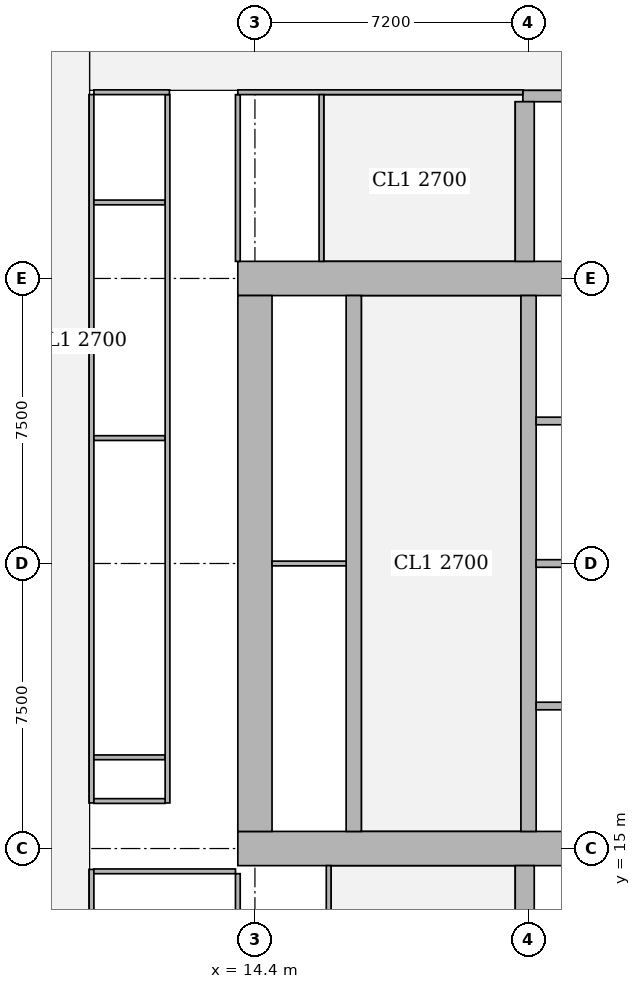
"""IFC4 building model, lengths in metres.
Left out: names, types, materials, properties, quantities, classifications, styles, units other than length and angle.
Written with IfcOpenShell. Run it as: python <this file> out.ifc"""

import sys

from ifc_helpers import new_model, si_unit, direction, frame, frame_2d, origin, place, context, subcontext, project, spatial, rectangle, extrude, element, fill, save


model = new_model("IFC4")
c1 = context("Model", 3, precision=1e-05, world=origin(), true_north=direction((0.0, 1.0)))
c2 = subcontext(c1, "Body", "Model", "MODEL_VIEW")
j1 = project(units=[si_unit("LENGTHUNIT", "METRE"), si_unit("PLANEANGLEUNIT", "RADIAN")], contexts=[c1])
p1 = place(None, origin())
s1 = spatial("IfcSite", under=j1, at=p1, CompositionType="ELEMENT")
p2 = place(p1, origin())
s2 = spatial("IfcBuilding", under=s1, at=p2, CompositionType="ELEMENT")
p3 = place(p2, frame((0.0, 0.0, 169.55)))
s3 = spatial("IfcBuildingStorey", under=s2, at=p3, CompositionType="ELEMENT", Elevation=169.55)
p4 = place(p3, frame((13.95, 15.0, 0.0), z_axis=(0.0, 0.0, 1.0), x_axis=(1.0, 0.0, 0.0)))
e1 = element("IfcWall", 1, at=p4, inside=s3, PredefinedType="SHEAR", context=c2, shape_type="SweptSolid", body=[
    extrude(rectangle(XDim=15.3, YDim=0.9, at=frame_2d((7.65, 0.0))), origin(), (0.0, 0.0, 1.0), 3.75),
])
p5 = place(p4, frame((4.45, 0.0, 0.0)))
e2 = element("IfcOpeningElement", 2, at=p5, cuts=e1, PredefinedType="OPENING", context=c2, shape_type="SweptSolid", body=[
    extrude(rectangle(XDim=1.8, YDim=2.1, at=frame_2d((0.9, 1.05))), frame((0.0, 0.46, 0.0), z_axis=(0.0, -1.0, 0.0), x_axis=(1.0, 0.0, 0.0)), (0.0, 0.0, 1.0), 0.92),
])
p6 = place(p4, frame((10.7, 0.0, 0.0)))
e3 = element("IfcOpeningElement", 3, at=p6, cuts=e1, PredefinedType="OPENING", context=c2, shape_type="SweptSolid", body=[
    extrude(rectangle(XDim=1.1, YDim=2.1, at=frame_2d((0.55, 1.05))), frame((0.0, 0.46, 0.0), z_axis=(0.0, -1.0, 0.0), x_axis=(1.0, 0.0, 0.0)), (0.0, 0.0, 1.0), 0.92),
])
p7 = place(p3, frame((13.95, 30.0, 0.0), z_axis=(0.0, 0.0, 1.0), x_axis=(1.0, 0.0, 0.0)))
e4 = element("IfcWall", 4, at=p7, inside=s3, PredefinedType="SHEAR", context=c2, shape_type="SweptSolid", body=[
    extrude(rectangle(XDim=15.3, YDim=0.9, at=frame_2d((7.65, 0.0))), origin(), (0.0, 0.0, 1.0), 3.75),
])
p8 = place(p7, frame((4.45, 0.0, 0.0)))
e5 = element("IfcOpeningElement", 5, at=p8, cuts=e4, PredefinedType="OPENING", context=c2, shape_type="SweptSolid", body=[
    extrude(rectangle(XDim=1.8, YDim=2.1, at=frame_2d((0.9, 1.05))), frame((0.0, 0.46, 0.0), z_axis=(0.0, -1.0, 0.0), x_axis=(1.0, 0.0, 0.0)), (0.0, 0.0, 1.0), 0.92),
])
p9 = place(p7, frame((10.7, 0.0, 0.0)))
e6 = element("IfcOpeningElement", 6, at=p9, cuts=e4, PredefinedType="OPENING", context=c2, shape_type="SweptSolid", body=[
    extrude(rectangle(XDim=1.1, YDim=2.1, at=frame_2d((0.55, 1.05))), frame((0.0, 0.46, 0.0), z_axis=(0.0, -1.0, 0.0), x_axis=(1.0, 0.0, 0.0)), (0.0, 0.0, 1.0), 0.92),
])
p10 = place(p3, frame((14.4, 15.45, 0.0), z_axis=(0.0, 0.0, 1.0), x_axis=(0.0, 1.0, 0.0)))
e7 = element("IfcWall", 7, at=p10, inside=s3, PredefinedType="SHEAR", context=c2, shape_type="SweptSolid", body=[
    extrude(rectangle(XDim=14.1, YDim=0.9, at=frame_2d((7.05, 0.0))), origin(), (0.0, 0.0, 1.0), 3.75),
])
p11 = place(p3, frame((17.0, 15.45, 0.0), z_axis=(0.0, 0.0, 1.0), x_axis=(0.0, 1.0, 0.0)))
e8 = element("IfcWall", 8, at=p11, inside=s3, PredefinedType="SHEAR", context=c2, shape_type="SweptSolid", body=[
    extrude(rectangle(XDim=14.1, YDim=0.4, at=frame_2d((7.05, 0.0))), origin(), (0.0, 0.0, 1.0), 3.75),
])
p12 = place(p11, frame((0.925, 0.0, 0.0)))
e9 = element("IfcOpeningElement", 9, at=p12, cuts=e8, PredefinedType="OPENING", context=c2, shape_type="SweptSolid", body=[
    extrude(rectangle(XDim=1.0, YDim=2.1, at=frame_2d((0.5, 1.05))), frame((0.0, 0.21, 0.0), z_axis=(0.0, -1.0, 0.0), x_axis=(1.0, 0.0, 0.0)), (0.0, 0.0, 1.0), 0.42),
])
p13 = place(p11, frame((4.675, 0.0, 0.0)))
e10 = element("IfcOpeningElement", 10, at=p13, cuts=e8, PredefinedType="OPENING", context=c2, shape_type="SweptSolid", body=[
    extrude(rectangle(XDim=1.0, YDim=2.1, at=frame_2d((0.5, 1.05))), frame((0.0, 0.21, 0.0), z_axis=(0.0, -1.0, 0.0), x_axis=(1.0, 0.0, 0.0)), (0.0, 0.0, 1.0), 0.42),
])
p14 = place(p11, frame((8.425, 0.0, 0.0)))
e11 = element("IfcOpeningElement", 11, at=p14, cuts=e8, PredefinedType="OPENING", context=c2, shape_type="SweptSolid", body=[
    extrude(rectangle(XDim=1.0, YDim=2.1, at=frame_2d((0.5, 1.05))), frame((0.0, 0.21, 0.0), z_axis=(0.0, -1.0, 0.0), x_axis=(1.0, 0.0, 0.0)), (0.0, 0.0, 1.0), 0.42),
])
p15 = place(p11, frame((12.175, 0.0, 0.0)))
e12 = element("IfcOpeningElement", 12, at=p15, cuts=e8, PredefinedType="OPENING", context=c2, shape_type="SweptSolid", body=[
    extrude(rectangle(XDim=1.0, YDim=2.1, at=frame_2d((0.5, 1.05))), frame((0.0, 0.21, 0.0), z_axis=(0.0, -1.0, 0.0), x_axis=(1.0, 0.0, 0.0)), (0.0, 0.0, 1.0), 0.42),
])
p16 = place(p3, frame((21.6, 15.45, 0.0), z_axis=(0.0, 0.0, 1.0), x_axis=(0.0, 1.0, 0.0)))
e13 = element("IfcWall", 13, at=p16, inside=s3, PredefinedType="SHEAR", context=c2, shape_type="SweptSolid", body=[
    extrude(rectangle(XDim=14.1, YDim=0.4, at=frame_2d((7.05, 0.0))), origin(), (0.0, 0.0, 1.0), 3.75),
])
p17 = place(p16, frame((0.875, 0.0, 0.0)))
e14 = element("IfcOpeningElement", 14, at=p17, cuts=e13, PredefinedType="OPENING", context=c2, shape_type="SweptSolid", body=[
    extrude(rectangle(XDim=1.1, YDim=2.1, at=frame_2d((0.55, 1.05))), frame((0.0, 0.21, 0.0), z_axis=(0.0, -1.0, 0.0), x_axis=(1.0, 0.0, 0.0)), (0.0, 0.0, 1.0), 0.42),
])
p18 = place(p16, frame((4.625, 0.0, 0.0)))
e15 = element("IfcOpeningElement", 15, at=p18, cuts=e13, PredefinedType="OPENING", context=c2, shape_type="SweptSolid", body=[
    extrude(rectangle(XDim=1.1, YDim=2.1, at=frame_2d((0.55, 1.05))), frame((0.0, 0.21, 0.0), z_axis=(0.0, -1.0, 0.0), x_axis=(1.0, 0.0, 0.0)), (0.0, 0.0, 1.0), 0.42),
])
p19 = place(p16, frame((8.375, 0.0, 0.0)))
e16 = element("IfcOpeningElement", 16, at=p19, cuts=e13, PredefinedType="OPENING", context=c2, shape_type="SweptSolid", body=[
    extrude(rectangle(XDim=1.1, YDim=2.1, at=frame_2d((0.55, 1.05))), frame((0.0, 0.21, 0.0), z_axis=(0.0, -1.0, 0.0), x_axis=(1.0, 0.0, 0.0)), (0.0, 0.0, 1.0), 0.42),
])
p20 = place(p16, frame((12.125, 0.0, 0.0)))
e17 = element("IfcOpeningElement", 17, at=p20, cuts=e13, PredefinedType="OPENING", context=c2, shape_type="SweptSolid", body=[
    extrude(rectangle(XDim=1.1, YDim=2.1, at=frame_2d((0.55, 1.05))), frame((0.0, 0.21, 0.0), z_axis=(0.0, -1.0, 0.0), x_axis=(1.0, 0.0, 0.0)), (0.0, 0.0, 1.0), 0.42),
])
p21 = place(p3, frame((21.5, 10.35, 0.0), z_axis=(0.0, 0.0, 1.0), x_axis=(0.0, 1.0, 0.0)))
e18 = element("IfcWall", 18, at=p21, inside=s3, PredefinedType="SHEAR", context=c2, shape_type="SweptSolid", body=[
    extrude(rectangle(XDim=4.2, YDim=0.5, at=frame_2d((2.1, 0.0))), origin(), (0.0, 0.0, 1.0), 3.75),
])
p22 = place(p3, frame((21.45, 34.8, 0.0), z_axis=(0.0, 0.0, 1.0), x_axis=(1.0, 0.0, 0.0)))
e19 = element("IfcWall", 19, at=p22, inside=s3, PredefinedType="SHEAR", context=c2, shape_type="SweptSolid", body=[
    extrude(rectangle(XDim=7.5, YDim=0.3, at=frame_2d((3.75, 0.0))), origin(), (0.0, 0.0, 1.0), 3.75),
])
p23 = place(p22, frame((0.5, 0.0, 0.0)))
e20 = element("IfcOpeningElement", 20, at=p23, cuts=e19, PredefinedType="OPENING", context=c2, shape_type="SweptSolid", body=[
    extrude(rectangle(XDim=1.1, YDim=2.1, at=frame_2d((0.55, 1.05))), frame((0.0, 0.16, 0.0), z_axis=(0.0, -1.0, 0.0), x_axis=(1.0, 0.0, 0.0)), (0.0, 0.0, 1.0), 0.32),
])
p24 = place(p3, frame((21.5, 30.45, 0.0), z_axis=(0.0, 0.0, 1.0), x_axis=(0.0, 1.0, 0.0)))
e21 = element("IfcWall", 21, at=p24, inside=s3, PredefinedType="SHEAR", context=c2, shape_type="SweptSolid", body=[
    extrude(rectangle(XDim=4.2, YDim=0.5, at=frame_2d((2.1, 0.0))), origin(), (0.0, 0.0, 1.0), 3.75),
])
p25 = place(p3, frame((10.1, 10.162, 0.0), z_axis=(0.0, 0.0, 1.0), x_axis=(0.0, 1.0, 0.0)))
e22 = element("IfcWall", 22, at=p25, inside=s3, PredefinedType="PARTITIONING", context=c2, shape_type="SweptSolid", body=[
    extrude(rectangle(XDim=4.288, YDim=0.125, at=frame_2d((2.144, 0.0))), origin(), (0.0, 0.0, 1.0), 3.5),
])
p26 = place(p25, frame((1.563, 0.0, 0.0)))
e23 = element("IfcOpeningElement", 23, at=p26, cuts=e22, PredefinedType="OPENING", context=c2, shape_type="SweptSolid", body=[
    extrude(rectangle(XDim=1.0, YDim=2.1, at=frame_2d((0.5, 1.05))), frame((0.0, 0.073, 0.0), z_axis=(0.0, -1.0, 0.0), x_axis=(1.0, 0.0, 0.0)), (0.0, 0.0, 1.0), 0.145),
])
p27 = place(p3, frame((10.1, 16.2, 0.0), z_axis=(0.0, 0.0, 1.0), x_axis=(0.0, 1.0, 0.0)))
e24 = element("IfcWall", 24, at=p27, inside=s3, PredefinedType="PARTITIONING", context=c2, shape_type="SweptSolid", body=[
    extrude(rectangle(XDim=18.638, YDim=0.125, at=frame_2d((9.319, 0.0))), origin(), (0.0, 0.0, 1.0), 3.5),
])
p28 = place(p27, frame((4.9, 0.0, 0.0)))
e25 = element("IfcOpeningElement", 25, at=p28, cuts=e24, PredefinedType="OPENING", context=c2, shape_type="SweptSolid", body=[
    extrude(rectangle(XDim=1.0, YDim=2.1, at=frame_2d((0.5, 1.05))), frame((0.0, 0.073, 0.0), z_axis=(0.0, -1.0, 0.0), x_axis=(1.0, 0.0, 0.0)), (0.0, 0.0, 1.0), 0.145),
])
p29 = place(p27, frame((12.2, 0.0, 0.0)))
e26 = element("IfcOpeningElement", 26, at=p29, cuts=e24, PredefinedType="OPENING", context=c2, shape_type="SweptSolid", body=[
    extrude(rectangle(XDim=1.0, YDim=2.1, at=frame_2d((0.5, 1.05))), frame((0.0, 0.073, 0.0), z_axis=(0.0, -1.0, 0.0), x_axis=(1.0, 0.0, 0.0)), (0.0, 0.0, 1.0), 0.145),
])
p30 = place(p27, frame((16.775, 0.0, 0.0)))
e27 = element("IfcOpeningElement", 27, at=p30, cuts=e24, PredefinedType="OPENING", context=c2, shape_type="SweptSolid", body=[
    extrude(rectangle(XDim=1.0, YDim=2.1, at=frame_2d((0.5, 1.05))), frame((0.0, 0.073, 0.0), z_axis=(0.0, -1.0, 0.0), x_axis=(1.0, 0.0, 0.0)), (0.0, 0.0, 1.0), 0.145),
])
p31 = place(p3, frame((10.162, 14.4, 0.0), z_axis=(0.0, 0.0, 1.0), x_axis=(1.0, 0.0, 0.0)))
e28 = element("IfcWall", 28, at=p31, inside=s3, PredefinedType="PARTITIONING", context=c2, shape_type="SweptSolid", body=[
    extrude(rectangle(XDim=3.726, YDim=0.125, at=frame_2d((1.863, 0.0))), origin(), (0.0, 0.0, 1.0), 3.5),
])
for number, where, z_axis, x_axis in (
    (29, (10.162, 17.4, 0.0), (0.0, 0.0, 1.0), (1.0, 0.0, 0.0)),
    (30, (10.162, 25.8, 0.0), (0.0, 0.0, 1.0), (1.0, 0.0, 0.0)),
    (31, (10.162, 32.0, 0.0), (0.0, 0.0, 1.0), (1.0, 0.0, 0.0)),
):
    element("IfcWall", number, at=place(p3, frame(where, z_axis=z_axis, x_axis=x_axis)), inside=s3, PredefinedType="PARTITIONING", context=c2, shape_type="SweptSolid", body=[
        extrude(rectangle(XDim=1.875, YDim=0.125, at=frame_2d((0.938, 0.0))), origin(), (0.0, 0.0, 1.0), 3.5),
    ])
p32 = place(p3, frame((12.1, 16.2, 0.0), z_axis=(0.0, 0.0, 1.0), x_axis=(0.0, 1.0, 0.0)))
e32 = element("IfcWall", 32, at=p32, inside=s3, PredefinedType="PARTITIONING", context=c2, shape_type="SweptSolid", body=[
    extrude(rectangle(XDim=18.637, YDim=0.125, at=frame_2d((9.318, 0.0))), origin(), (0.0, 0.0, 1.0), 3.5),
])
p33 = place(p3, frame((10.162, 16.25, 0.0), z_axis=(0.0, 0.0, 1.0), x_axis=(1.0, 0.0, 0.0)))
e33 = element("IfcWall", 33, at=p33, inside=s3, PredefinedType="PARTITIONING", context=c2, shape_type="SweptSolid", body=[
    extrude(rectangle(XDim=1.875, YDim=0.125, at=frame_2d((0.938, 0.0))), origin(), (0.0, 0.0, 1.0), 3.5),
])
p34 = place(p3, frame((13.95, 10.163, 0.0), z_axis=(0.0, 0.0, 1.0), x_axis=(0.0, 1.0, 0.0)))
e34 = element("IfcWall", 34, at=p34, inside=s3, PredefinedType="PARTITIONING", context=c2, shape_type="SweptSolid", body=[
    extrude(rectangle(XDim=4.175, YDim=0.125, at=frame_2d((2.087, 0.0))), origin(), (0.0, 0.0, 1.0), 3.5),
])
p35 = place(p3, frame((13.95, 30.45, 0.0), z_axis=(0.0, 0.0, 1.0), x_axis=(0.0, 1.0, 0.0)))
e35 = element("IfcWall", 35, at=p35, inside=s3, PredefinedType="PARTITIONING", context=c2, shape_type="SweptSolid", body=[
    extrude(rectangle(XDim=4.387, YDim=0.125, at=frame_2d((2.193, 0.0))), origin(), (0.0, 0.0, 1.0), 3.5),
])
p36 = place(p3, frame((10.162, 34.9, 0.0), z_axis=(0.0, 0.0, 1.0), x_axis=(1.0, 0.0, 0.0)))
e36 = element("IfcWall", 36, at=p36, inside=s3, PredefinedType="PARTITIONING", context=c2, shape_type="SweptSolid", body=[
    extrude(rectangle(XDim=1.988, YDim=0.125, at=frame_2d((0.994, 0.0))), origin(), (0.0, 0.0, 1.0), 3.5),
])
p37 = place(p3, frame((13.95, 34.9, 0.0), z_axis=(0.0, 0.0, 1.0), x_axis=(1.0, 0.0, 0.0)))
e37 = element("IfcWall", 37, at=p37, inside=s3, PredefinedType="PARTITIONING", context=c2, shape_type="SweptSolid", body=[
    extrude(rectangle(XDim=7.5, YDim=0.125, at=frame_2d((3.75, 0.0))), origin(), (0.0, 0.0, 1.0), 3.5),
])
p38 = place(p37, frame((3.95, 0.0, 0.0)))
e38 = element("IfcOpeningElement", 38, at=p38, cuts=e37, PredefinedType="OPENING", context=c2, shape_type="SweptSolid", body=[
    extrude(rectangle(XDim=1.8, YDim=2.1, at=frame_2d((0.9, 1.05))), frame((0.0, 0.073, 0.0), z_axis=(0.0, -1.0, 0.0), x_axis=(1.0, 0.0, 0.0)), (0.0, 0.0, 1.0), 0.145),
])
p39 = place(p3, frame((16.34, 10.163, 0.0), z_axis=(0.0, 0.0, 1.0), x_axis=(0.0, 1.0, 0.0)))
e39 = element("IfcWall", 39, at=p39, inside=s3, PredefinedType="PARTITIONING", context=c2, shape_type="SweptSolid", body=[
    extrude(rectangle(XDim=4.387, YDim=0.125, at=frame_2d((2.193, 0.0))), origin(), (0.0, 0.0, 1.0), 3.5),
])
p40 = place(p39, frame((1.637, 0.0, 0.0)))
e40 = element("IfcOpeningElement", 40, at=p40, cuts=e39, PredefinedType="OPENING", context=c2, shape_type="SweptSolid", body=[
    extrude(rectangle(XDim=1.0, YDim=2.1, at=frame_2d((0.5, 1.05))), frame((0.0, 0.073, 0.0), z_axis=(0.0, -1.0, 0.0), x_axis=(1.0, 0.0, 0.0)), (0.0, 0.0, 1.0), 0.145),
])
p41 = place(p3, frame((16.15, 30.45, 0.0), z_axis=(0.0, 0.0, 1.0), x_axis=(0.0, 1.0, 0.0)))
e41 = element("IfcWall", 41, at=p41, inside=s3, PredefinedType="PARTITIONING", context=c2, shape_type="SweptSolid", body=[
    extrude(rectangle(XDim=4.387, YDim=0.125, at=frame_2d((2.193, 0.0))), origin(), (0.0, 0.0, 1.0), 3.5),
])
p42 = place(p41, frame((1.75, 0.0, 0.0)))
e42 = element("IfcOpeningElement", 42, at=p42, cuts=e41, PredefinedType="OPENING", context=c2, shape_type="SweptSolid", body=[
    extrude(rectangle(XDim=1.0, YDim=2.1, at=frame_2d((0.5, 1.05))), frame((0.0, 0.073, 0.0), z_axis=(0.0, -1.0, 0.0), x_axis=(1.0, 0.0, 0.0)), (0.0, 0.0, 1.0), 0.145),
])
p43 = place(p3, frame((14.85, 22.5, 0.0), z_axis=(0.0, 0.0, 1.0), x_axis=(1.0, 0.0, 0.0)))
e43 = element("IfcWall", 43, at=p43, inside=s3, PredefinedType="PARTITIONING", context=c2, shape_type="SweptSolid", body=[
    extrude(rectangle(XDim=1.95, YDim=0.125, at=frame_2d((0.975, 0.0))), origin(), (0.0, 0.0, 1.0), 3.5),
])
for number, where, z_axis, x_axis in (
    (44, (21.8, 18.75, 0.0), (0.0, 0.0, 1.0), (1.0, 0.0, 0.0)),
    (45, (21.8, 22.5, 0.0), (0.0, 0.0, 1.0), (1.0, 0.0, 0.0)),
    (46, (21.8, 26.25, 0.0), (0.0, 0.0, 1.0), (1.0, 0.0, 0.0)),
):
    element("IfcWall", number, at=place(p3, frame(where, z_axis=z_axis, x_axis=x_axis)), inside=s3, PredefinedType="SOLIDWALL", context=c2, shape_type="SweptSolid", body=[
        extrude(rectangle(XDim=2.2, YDim=0.2, at=frame_2d((1.1, 0.0))), origin(), (0.0, 0.0, 1.0), 3.5),
    ])
p44 = place(p28, origin())
e47 = element("IfcDoor", 47, at=p44, inside=s3, OperationType="SINGLE_SWING_RIGHT", PredefinedType="DOOR", context=c2, shape_type="SweptSolid", body=[
    extrude(rectangle(XDim=1.0, YDim=2.1, at=frame_2d((0.5, 1.05))), frame((0.0, 0.025, 0.0), z_axis=(0.0, -1.0, 0.0), x_axis=(1.0, 0.0, 0.0)), (0.0, 0.0, 1.0), 0.05),
])
fill(e25, e47)
p45 = place(p29, origin())
e48 = element("IfcDoor", 48, at=p45, inside=s3, OperationType="SINGLE_SWING_RIGHT", PredefinedType="DOOR", context=c2, shape_type="SweptSolid", body=[
    extrude(rectangle(XDim=1.0, YDim=2.1, at=frame_2d((0.5, 1.05))), frame((0.0, 0.025, 0.0), z_axis=(0.0, -1.0, 0.0), x_axis=(1.0, 0.0, 0.0)), (0.0, 0.0, 1.0), 0.05),
])
fill(e26, e48)
p46 = place(p30, origin())
e49 = element("IfcDoor", 49, at=p46, inside=s3, OperationType="SINGLE_SWING_LEFT", PredefinedType="DOOR", context=c2, shape_type="SweptSolid", body=[
    extrude(rectangle(XDim=1.0, YDim=2.1, at=frame_2d((0.5, 1.05))), frame((0.0, 0.025, 0.0), z_axis=(0.0, -1.0, 0.0), x_axis=(1.0, 0.0, 0.0)), (0.0, 0.0, 1.0), 0.05),
])
fill(e27, e49)
p47 = place(p42, origin())
e50 = element("IfcDoor", 50, at=p47, inside=s3, OperationType="SINGLE_SWING_RIGHT", PredefinedType="DOOR", context=c2, shape_type="SweptSolid", body=[
    extrude(rectangle(XDim=1.0, YDim=2.1, at=frame_2d((0.5, 1.05))), frame((0.0, 0.025, 0.0), z_axis=(0.0, -1.0, 0.0), x_axis=(1.0, 0.0, 0.0)), (0.0, 0.0, 1.0), 0.05),
])
fill(e42, e50)
p48 = place(p38, origin())
e51 = element("IfcDoor", 51, at=p48, inside=s3, OperationType="DOUBLE_DOOR_SINGLE_SWING", PredefinedType="DOOR", context=c2, shape_type="SweptSolid", body=[
    extrude(rectangle(XDim=1.8, YDim=2.1, at=frame_2d((0.9, 1.05))), frame((0.0, 0.025, 0.0), z_axis=(0.0, -1.0, 0.0), x_axis=(1.0, 0.0, 0.0)), (0.0, 0.0, 1.0), 0.05),
])
fill(e38, e51)
p49 = place(p12, origin())
e52 = element("IfcDoor", 52, at=p49, inside=s3, OperationType="SINGLE_SWING_LEFT", PredefinedType="DOOR", context=c2, shape_type="SweptSolid", body=[
    extrude(rectangle(XDim=1.0, YDim=2.1, at=frame_2d((0.5, 1.05))), frame((0.0, 0.025, 0.0), z_axis=(0.0, -1.0, 0.0), x_axis=(1.0, 0.0, 0.0)), (0.0, 0.0, 1.0), 0.05),
])
fill(e9, e52)
p50 = place(p13, origin())
e53 = element("IfcDoor", 53, at=p50, inside=s3, OperationType="SINGLE_SWING_RIGHT", PredefinedType="DOOR", context=c2, shape_type="SweptSolid", body=[
    extrude(rectangle(XDim=1.0, YDim=2.1, at=frame_2d((0.5, 1.05))), frame((0.0, 0.025, 0.0), z_axis=(0.0, -1.0, 0.0), x_axis=(1.0, 0.0, 0.0)), (0.0, 0.0, 1.0), 0.05),
])
fill(e10, e53)
p51 = place(p14, origin())
e54 = element("IfcDoor", 54, at=p51, inside=s3, OperationType="SINGLE_SWING_LEFT", PredefinedType="DOOR", context=c2, shape_type="SweptSolid", body=[
    extrude(rectangle(XDim=1.0, YDim=2.1, at=frame_2d((0.5, 1.05))), frame((0.0, 0.025, 0.0), z_axis=(0.0, -1.0, 0.0), x_axis=(1.0, 0.0, 0.0)), (0.0, 0.0, 1.0), 0.05),
])
fill(e11, e54)
p52 = place(p15, origin())
e55 = element("IfcDoor", 55, at=p52, inside=s3, OperationType="SINGLE_SWING_RIGHT", PredefinedType="DOOR", context=c2, shape_type="SweptSolid", body=[
    extrude(rectangle(XDim=1.0, YDim=2.1, at=frame_2d((0.5, 1.05))), frame((0.0, 0.025, 0.0), z_axis=(0.0, -1.0, 0.0), x_axis=(1.0, 0.0, 0.0)), (0.0, 0.0, 1.0), 0.05),
])
fill(e12, e55)
p53 = place(p5, origin())
e56 = element("IfcDoor", 56, at=p53, inside=s3, OperationType="DOUBLE_DOOR_SINGLE_SWING", PredefinedType="DOOR", context=c2, shape_type="SweptSolid", body=[
    extrude(rectangle(XDim=1.8, YDim=2.1, at=frame_2d((0.9, 1.05))), frame((0.0, 0.025, 0.0), z_axis=(0.0, -1.0, 0.0), x_axis=(1.0, 0.0, 0.0)), (0.0, 0.0, 1.0), 0.05),
])
fill(e2, e56)
p54 = place(p8, origin())
e57 = element("IfcDoor", 57, at=p54, inside=s3, OperationType="DOUBLE_DOOR_SINGLE_SWING", PredefinedType="DOOR", context=c2, shape_type="SweptSolid", body=[
    extrude(rectangle(XDim=1.8, YDim=2.1, at=frame_2d((0.9, 1.05))), frame((0.0, 0.025, 0.0), z_axis=(0.0, -1.0, 0.0), x_axis=(1.0, 0.0, 0.0)), (0.0, 0.0, 1.0), 0.05),
])
fill(e5, e57)
p55 = place(p17, origin())
e58 = element("IfcDoor", 58, at=p55, inside=s3, OperationType="DOUBLE_DOOR_SLIDING", PredefinedType="DOOR", context=c2, shape_type="SweptSolid", body=[
    extrude(rectangle(XDim=1.1, YDim=2.1, at=frame_2d((0.55, 1.05))), frame((0.0, 0.025, 0.0), z_axis=(0.0, -1.0, 0.0), x_axis=(1.0, 0.0, 0.0)), (0.0, 0.0, 1.0), 0.05),
])
fill(e14, e58)
p56 = place(p18, origin())
e59 = element("IfcDoor", 59, at=p56, inside=s3, OperationType="DOUBLE_DOOR_SLIDING", PredefinedType="DOOR", context=c2, shape_type="SweptSolid", body=[
    extrude(rectangle(XDim=1.1, YDim=2.1, at=frame_2d((0.55, 1.05))), frame((0.0, 0.025, 0.0), z_axis=(0.0, -1.0, 0.0), x_axis=(1.0, 0.0, 0.0)), (0.0, 0.0, 1.0), 0.05),
])
fill(e15, e59)
p57 = place(p19, origin())
e60 = element("IfcDoor", 60, at=p57, inside=s3, OperationType="DOUBLE_DOOR_SLIDING", PredefinedType="DOOR", context=c2, shape_type="SweptSolid", body=[
    extrude(rectangle(XDim=1.1, YDim=2.1, at=frame_2d((0.55, 1.05))), frame((0.0, 0.025, 0.0), z_axis=(0.0, -1.0, 0.0), x_axis=(1.0, 0.0, 0.0)), (0.0, 0.0, 1.0), 0.05),
])
fill(e16, e60)
p58 = place(p20, origin())
e61 = element("IfcDoor", 61, at=p58, inside=s3, OperationType="DOUBLE_DOOR_SLIDING", PredefinedType="DOOR", context=c2, shape_type="SweptSolid", body=[
    extrude(rectangle(XDim=1.1, YDim=2.1, at=frame_2d((0.55, 1.05))), frame((0.0, 0.025, 0.0), z_axis=(0.0, -1.0, 0.0), x_axis=(1.0, 0.0, 0.0)), (0.0, 0.0, 1.0), 0.05),
])
fill(e17, e61)
p59 = place(p23, origin())
e62 = element("IfcDoor", 62, at=p59, inside=s3, OperationType="SINGLE_SWING_RIGHT", PredefinedType="DOOR", context=c2, shape_type="SweptSolid", body=[
    extrude(rectangle(XDim=1.1, YDim=2.1, at=frame_2d((0.55, 1.05))), frame((0.0, 0.025, 0.0), z_axis=(0.0, -1.0, 0.0), x_axis=(1.0, 0.0, 0.0)), (0.0, 0.0, 1.0), 0.05),
])
fill(e20, e62)
save(model, sys.argv[1])
